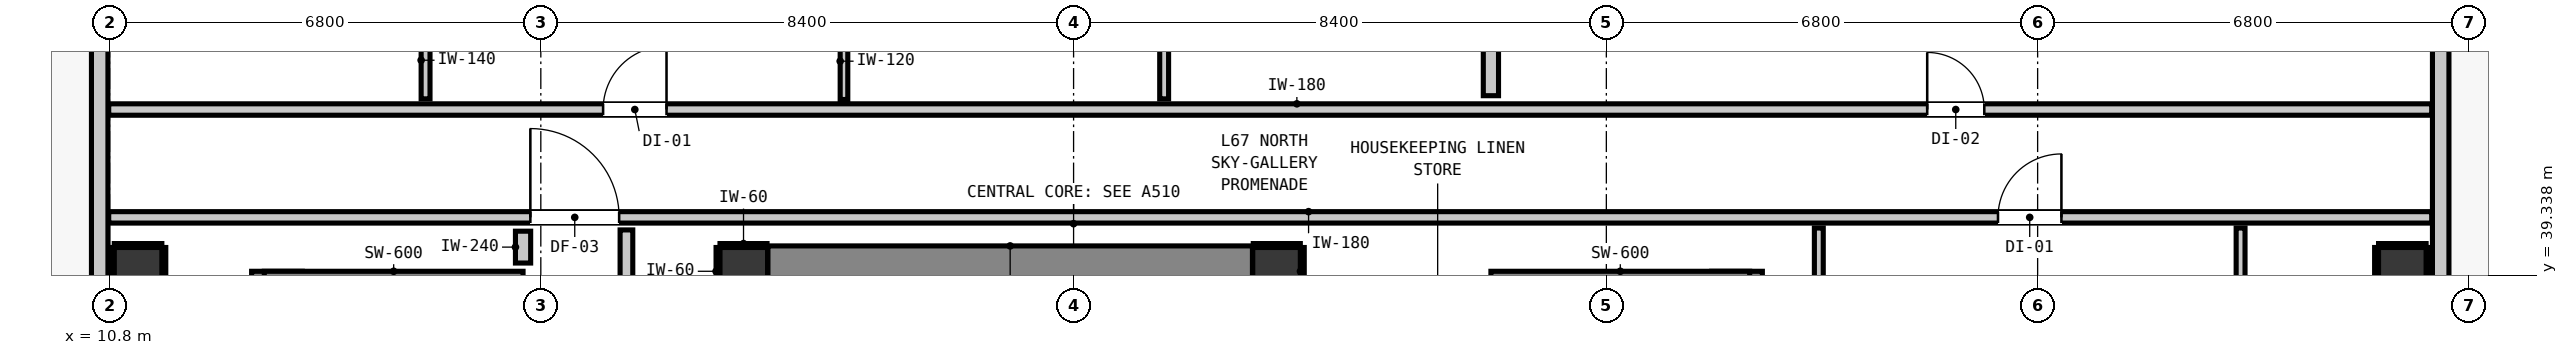
"""IFC4 building model, lengths in metres.
Left out: names, types, materials, properties, quantities, classifications, styles, units other than length and angle.
Written with IfcOpenShell. Run it as: python <this file> out.ifc"""

import sys

from ifc_helpers import new_model, si_unit, direction, frame, frame_2d, origin, origin_2d, place, context, subcontext, project, spatial, rectangle, extrude, element, fill, save


model = new_model("IFC4")
c1 = context("Model", 3, precision=1e-05, world=origin(), true_north=direction((0.0, 1.0)))
c2 = subcontext(c1, "Body", "Model", "MODEL_VIEW")
j1 = project(units=[si_unit("LENGTHUNIT", "METRE"), si_unit("PLANEANGLEUNIT", "RADIAN")], contexts=[c1])
p1 = place(None, origin())
s1 = spatial("IfcSite", under=j1, at=p1, CompositionType="ELEMENT")
p2 = place(p1, origin())
s2 = spatial("IfcBuilding", under=s1, at=p2, CompositionType="ELEMENT")
p3 = place(p2, frame((0.0, 0.0, 231.28)))
s3 = spatial("IfcBuildingStorey", under=s2, at=p3, CompositionType="ELEMENT", Elevation=231.28)
for number, where, z_axis, x_axis in (
    (1, (20.8, 39.4, 0.0), (0.0, 0.0, 1.0), (1.0, 0.0, 0.0)),
    (2, (29.2, 39.4, 0.0), (0.0, 0.0, 1.0), (1.0, 0.0, 0.0)),
):
    element("IfcColumn", number, at=place(p3, frame(where, z_axis=z_axis, x_axis=x_axis)), inside=s3, PredefinedType="COLUMN", context=c2, shape_type="SweptSolid", body=[
        extrude(rectangle(XDim=0.75, YDim=0.75, at=origin_2d()), origin(), (0.0, 0.0, 1.0), 3.32),
    ])
p4 = place(p3, frame((13.44, 31.08, 0.0), z_axis=(0.0, 0.0, 1.0), x_axis=(0.0, 1.0, 0.0)))
e3 = element("IfcWall", 3, at=p4, inside=s3, PredefinedType="SHEAR", context=c2, shape_type="SweptSolid", body=[
    extrude(rectangle(XDim=8.32, YDim=0.8, at=frame_2d((4.16, 0.0))), origin(), (0.0, 0.0, 1.0), 3.32),
])
p5 = place(p3, frame((13.24, 39.1, 0.0), z_axis=(0.0, 0.0, 1.0), x_axis=(1.0, 0.0, 0.0)))
e4 = element("IfcWall", 4, at=p5, inside=s3, PredefinedType="SHEAR", context=c2, shape_type="SweptSolid", body=[
    extrude(rectangle(XDim=4.08, YDim=0.6, at=frame_2d((2.04, 0.0))), origin(), (0.0, 0.0, 1.0), 3.32),
])
p6 = place(p3, frame((36.46, 31.08, 0.0), z_axis=(0.0, 0.0, 1.0), x_axis=(0.0, 1.0, 0.0)))
e5 = element("IfcWall", 5, at=p6, inside=s3, PredefinedType="SHEAR", context=c2, shape_type="SweptSolid", body=[
    extrude(rectangle(XDim=8.32, YDim=0.8, at=frame_2d((4.16, 0.0))), origin(), (0.0, 0.0, 1.0), 3.32),
])
p7 = place(p3, frame((32.58, 39.1, 0.0), z_axis=(0.0, 0.0, 1.0), x_axis=(1.0, 0.0, 0.0)))
e6 = element("IfcWall", 6, at=p7, inside=s3, PredefinedType="SHEAR", context=c2, shape_type="SweptSolid", body=[
    extrude(rectangle(XDim=4.08, YDim=0.6, at=frame_2d((2.04, 0.0))), origin(), (0.0, 0.0, 1.0), 3.32),
])
p8 = place(p3, frame((21.18, 39.4, 0.0), z_axis=(0.0, 0.0, 1.0), x_axis=(1.0, 0.0, 0.0)))
e7 = element("IfcWall", 7, at=p8, inside=s3, PredefinedType="SHEAR", context=c2, shape_type="SweptSolid", body=[
    extrude(rectangle(XDim=7.64, YDim=0.8, at=frame_2d((3.82, 0.0))), origin(), (0.0, 0.0, 1.0), 3.32),
])
for number, where, z_axis, x_axis in (
    (8, (11.25, 39.4, -0.2), (0.0, 0.0, 1.0), (1.0, 0.0, 0.0)),
    (9, (46.95, 39.4, -0.2), (0.0, 0.0, 1.0), (1.0, 0.0, 0.0)),
):
    element("IfcColumn", number, at=place(p3, frame(where, z_axis=z_axis, x_axis=x_axis)), inside=s3, PredefinedType="COLUMN", context=c2, shape_type="SweptSolid", body=[
        extrude(rectangle(XDim=0.75, YDim=0.75, at=origin_2d()), origin(), (0.0, 0.0, 1.0), 3.52),
    ])
p9 = place(p3, frame((10.645, 18.545, 0.0), z_axis=(0.0, 0.0, 1.0), x_axis=(0.0, 1.0, 0.0)))
e10 = element("IfcWall", 10, at=p9, inside=s3, PredefinedType="STANDARD", context=c2, shape_type="SweptSolid", body=[
    extrude(rectangle(XDim=30.31, YDim=0.26, at=frame_2d((15.155, 0.0))), origin(), (0.0, 0.0, 1.0), 3.1),
])
p10 = place(p9, frame((27.695, 0.0, 0.0)))
e11 = element("IfcOpeningElement", 11, at=p10, cuts=e10, PredefinedType="OPENING", context=c2, shape_type="SweptSolid", body=[
    extrude(rectangle(XDim=1.0, YDim=2.15, at=frame_2d((0.5, 1.075))), frame((0.0, 0.14, 0.0), z_axis=(0.0, -1.0, 0.0), x_axis=(1.0, 0.0, 0.0)), (0.0, 0.0, 1.0), 0.28),
])
p11 = place(p9, frame((29.108, 0.0, 0.85)))
e12 = element("IfcOpeningElement", 12, at=p11, cuts=e10, PredefinedType="OPENING", context=c2, shape_type="SweptSolid", body=[
    extrude(rectangle(XDim=0.9, YDim=1.5, at=frame_2d((0.45, 0.75))), frame((0.0, 0.14, 0.0), z_axis=(0.0, -1.0, 0.0), x_axis=(1.0, 0.0, 0.0)), (0.0, 0.0, 1.0), 0.28),
])
p12 = place(p3, frame((47.555, 48.855, 0.0), z_axis=(0.0, 0.0, 1.0), x_axis=(0.0, -1.0, 0.0)))
e13 = element("IfcWall", 13, at=p12, inside=s3, PredefinedType="STANDARD", context=c2, shape_type="SweptSolid", body=[
    extrude(rectangle(XDim=30.31, YDim=0.26, at=frame_2d((15.155, 0.0))), origin(), (0.0, 0.0, 1.0), 3.1),
])
p13 = place(p12, frame((0.91, 0.0, 0.0)))
e14 = element("IfcOpeningElement", 14, at=p13, cuts=e13, PredefinedType="OPENING", context=c2, shape_type="SweptSolid", body=[
    extrude(rectangle(XDim=1.0, YDim=2.15, at=frame_2d((0.5, 1.075))), frame((0.0, 0.14, 0.0), z_axis=(0.0, -1.0, 0.0), x_axis=(1.0, 0.0, 0.0)), (0.0, 0.0, 1.0), 0.28),
])
p14 = place(p12, frame((3.107, 0.0, 0.85)))
e15 = element("IfcOpeningElement", 15, at=p14, cuts=e13, PredefinedType="OPENING", context=c2, shape_type="SweptSolid", body=[
    extrude(rectangle(XDim=2.7, YDim=2.0, at=frame_2d((1.35, 1.0))), frame((0.0, 0.14, 0.0), z_axis=(0.0, -1.0, 0.0), x_axis=(1.0, 0.0, 0.0)), (0.0, 0.0, 1.0), 0.28),
])
p15 = place(p3, frame((10.787, 40.25, 0.0), z_axis=(0.0, 0.0, 1.0), x_axis=(1.0, 0.0, 0.0)))
e16 = element("IfcWall", 16, at=p15, inside=s3, PredefinedType="PARTITIONING", context=c2, shape_type="SweptSolid", body=[
    extrude(rectangle(XDim=36.626, YDim=0.18, at=frame_2d((18.313, 0.0))), origin(), (0.0, 0.0, 1.0), 3.1),
])
p16 = place(p15, frame((6.648, 0.0, 0.0)))
e17 = element("IfcOpeningElement", 17, at=p16, cuts=e16, PredefinedType="OPENING", context=c2, shape_type="SweptSolid", body=[
    extrude(rectangle(XDim=1.4, YDim=2.15, at=frame_2d((0.7, 1.075))), frame((0.0, 0.1, 0.0), z_axis=(0.0, -1.0, 0.0), x_axis=(1.0, 0.0, 0.0)), (0.0, 0.0, 1.0), 0.2),
])
p17 = place(p15, frame((29.788, 0.0, 0.0)))
e18 = element("IfcOpeningElement", 18, at=p17, cuts=e16, PredefinedType="OPENING", context=c2, shape_type="SweptSolid", body=[
    extrude(rectangle(XDim=1.0, YDim=2.15, at=frame_2d((0.5, 1.075))), frame((0.0, 0.1, 0.0), z_axis=(0.0, -1.0, 0.0), x_axis=(1.0, 0.0, 0.0)), (0.0, 0.0, 1.0), 0.2),
])
p18 = place(p3, frame((10.787, 41.95, 0.0), z_axis=(0.0, 0.0, 1.0), x_axis=(1.0, 0.0, 0.0)))
e19 = element("IfcWall", 19, at=p18, inside=s3, PredefinedType="PARTITIONING", context=c2, shape_type="SweptSolid", body=[
    extrude(rectangle(XDim=36.626, YDim=0.18, at=frame_2d((18.313, 0.0))), origin(), (0.0, 0.0, 1.0), 3.1),
])
p19 = place(p18, frame((7.795, 0.0, 0.0)))
e20 = element("IfcOpeningElement", 20, at=p19, cuts=e19, PredefinedType="OPENING", context=c2, shape_type="SweptSolid", body=[
    extrude(rectangle(XDim=1.0, YDim=2.15, at=frame_2d((0.5, 1.075))), frame((0.0, 0.1, 0.0), z_axis=(0.0, -1.0, 0.0), x_axis=(1.0, 0.0, 0.0)), (0.0, 0.0, 1.0), 0.2),
])
p20 = place(p18, frame((28.672, 0.0, 0.0)))
e21 = element("IfcOpeningElement", 21, at=p20, cuts=e19, PredefinedType="OPENING", context=c2, shape_type="SweptSolid", body=[
    extrude(rectangle(XDim=0.9, YDim=2.1, at=frame_2d((0.45, 1.05))), frame((0.0, 0.1, 0.0), z_axis=(0.0, -1.0, 0.0), x_axis=(1.0, 0.0, 0.0)), (0.0, 0.0, 1.0), 0.2),
])
p21 = place(p3, frame((17.32, 39.53, 0.0), z_axis=(0.0, 0.0, 1.0), x_axis=(0.0, 1.0, 0.0)))
e22 = element("IfcWall", 22, at=p21, inside=s3, PredefinedType="PARTITIONING", context=c2, shape_type="SweptSolid", body=[
    extrude(rectangle(XDim=0.502, YDim=0.24, at=frame_2d((0.251, 0.0))), origin(), (0.0, 0.0, 1.0), 3.1),
])
p22 = place(p3, frame((32.58, 42.168, 0.0), z_axis=(0.0, 0.0, 1.0), x_axis=(0.0, 1.0, 0.0)))
e23 = element("IfcWall", 23, at=p22, inside=s3, PredefinedType="PARTITIONING", context=c2, shape_type="SweptSolid", body=[
    extrude(rectangle(XDim=3.46, YDim=0.24, at=frame_2d((1.73, 0.0))), origin(), (0.0, 0.0, 1.0), 3.1),
])
p23 = place(p3, frame((18.95, 38.918, 0.0), z_axis=(0.0, 0.0, 1.0), x_axis=(0.0, 1.0, 0.0)))
e24 = element("IfcWall", 24, at=p23, inside=s3, PredefinedType="PARTITIONING", context=c2, shape_type="SweptSolid", body=[
    extrude(rectangle(XDim=1.134, YDim=0.2, at=frame_2d((0.567, 0.0))), origin(), (0.0, 0.0, 1.0), 3.1),
])
p24 = place(p3, frame((15.783, 42.118, 0.0), z_axis=(0.0, 0.0, 1.0), x_axis=(0.0, 1.0, 0.0)))
e25 = element("IfcWall", 25, at=p24, inside=s3, PredefinedType="PARTITIONING", context=c2, shape_type="SweptSolid", body=[
    extrude(rectangle(XDim=3.49, YDim=0.14, at=frame_2d((1.745, 0.0))), origin(), (0.0, 0.0, 1.0), 3.1),
])
p25 = place(p24, frame((1.318, 0.0, 0.0)))
e26 = element("IfcOpeningElement", 26, at=p25, cuts=e25, PredefinedType="OPENING", context=c2, shape_type="SweptSolid", body=[
    extrude(rectangle(XDim=0.86, YDim=2.02, at=frame_2d((0.43, 1.01))), frame((0.0, 0.08, 0.0), z_axis=(0.0, -1.0, 0.0), x_axis=(1.0, 0.0, 0.0)), (0.0, 0.0, 1.0), 0.16),
])
p26 = place(p3, frame((27.428, 42.118, 0.0), z_axis=(0.0, 0.0, 1.0), x_axis=(0.0, 1.0, 0.0)))
e27 = element("IfcWall", 27, at=p26, inside=s3, PredefinedType="PARTITIONING", context=c2, shape_type="SweptSolid", body=[
    extrude(rectangle(XDim=3.49, YDim=0.14, at=frame_2d((1.745, 0.0))), origin(), (0.0, 0.0, 1.0), 3.1),
])
p27 = place(p26, frame((1.285, 0.0, 0.0)))
e28 = element("IfcOpeningElement", 28, at=p27, cuts=e27, PredefinedType="OPENING", context=c2, shape_type="SweptSolid", body=[
    extrude(rectangle(XDim=0.9, YDim=2.1, at=frame_2d((0.45, 1.05))), frame((0.0, 0.08, 0.0), z_axis=(0.0, -1.0, 0.0), x_axis=(1.0, 0.0, 0.0)), (0.0, 0.0, 1.0), 0.16),
])
p28 = place(p3, frame((37.75, 30.848, 0.0), z_axis=(0.0, 0.0, 1.0), x_axis=(0.0, 1.0, 0.0)))
e29 = element("IfcWall", 29, at=p28, inside=s3, PredefinedType="PARTITIONING", context=c2, shape_type="SweptSolid", body=[
    extrude(rectangle(XDim=9.234, YDim=0.14, at=frame_2d((4.617, 0.0))), origin(), (0.0, 0.0, 1.0), 3.1),
])
p29 = place(p3, frame((44.4, 36.218, 0.0), z_axis=(0.0, 0.0, 1.0), x_axis=(0.0, 1.0, 0.0)))
e30 = element("IfcWall", 30, at=p29, inside=s3, PredefinedType="PARTITIONING", context=c2, shape_type="SweptSolid", body=[
    extrude(rectangle(XDim=3.864, YDim=0.14, at=frame_2d((1.932, 0.0))), origin(), (0.0, 0.0, 1.0), 3.1),
])
p30 = place(p29, frame((1.394, 0.0, 0.0)))
e31 = element("IfcOpeningElement", 31, at=p30, cuts=e30, PredefinedType="OPENING", context=c2, shape_type="SweptSolid", body=[
    extrude(rectangle(XDim=0.9, YDim=2.1, at=frame_2d((0.45, 1.05))), frame((0.0, 0.08, 0.0), z_axis=(0.0, -1.0, 0.0), x_axis=(1.0, 0.0, 0.0)), (0.0, 0.0, 1.0), 0.16),
])
p31 = place(p3, frame((22.38, 42.108, 0.0), z_axis=(0.0, 0.0, 1.0), x_axis=(0.0, 1.0, 0.0)))
e32 = element("IfcWall", 32, at=p31, inside=s3, PredefinedType="PARTITIONING", context=c2, shape_type="SweptSolid", body=[
    extrude(rectangle(XDim=3.51, YDim=0.12, at=frame_2d((1.755, 0.0))), origin(), (0.0, 0.0, 1.0), 3.1),
])
p32 = place(p31, frame((1.308, 0.0, 0.0)))
e33 = element("IfcOpeningElement", 33, at=p32, cuts=e32, PredefinedType="OPENING", context=c2, shape_type="SweptSolid", body=[
    extrude(rectangle(XDim=0.9, YDim=2.1, at=frame_2d((0.45, 1.05))), frame((0.0, 0.07, 0.0), z_axis=(0.0, -1.0, 0.0), x_axis=(1.0, 0.0, 0.0)), (0.0, 0.0, 1.0), 0.14),
])
p33 = place(p3, frame((20.425, 39.807, 0.0), z_axis=(0.0, 0.0, 1.0), x_axis=(1.0, 0.0, 0.0)))
e34 = element("IfcWall", 34, at=p33, inside=s3, PredefinedType="PARTITIONING", context=c2, shape_type="SweptSolid", body=[
    extrude(rectangle(XDim=0.742, YDim=0.06, at=frame_2d((0.371, 0.0))), origin(), (0.0, 0.0, 1.0), 1.45),
])
p34 = place(p3, frame((20.393, 39.025, 0.0), z_axis=(0.0, 0.0, 1.0), x_axis=(0.0, 1.0, 0.0)))
e35 = element("IfcWall", 35, at=p34, inside=s3, PredefinedType="PARTITIONING", context=c2, shape_type="SweptSolid", body=[
    extrude(rectangle(XDim=0.75, YDim=0.06, at=frame_2d((0.375, 0.0))), origin(), (0.0, 0.0, 1.0), 1.45),
])
p35 = place(p3, frame((28.833, 39.807, 0.0), z_axis=(0.0, 0.0, 1.0), x_axis=(1.0, 0.0, 0.0)))
e36 = element("IfcWall", 36, at=p35, inside=s3, PredefinedType="PARTITIONING", context=c2, shape_type="SweptSolid", body=[
    extrude(rectangle(XDim=0.742, YDim=0.06, at=frame_2d((0.371, 0.0))), origin(), (0.0, 0.0, 1.0), 1.45),
])
for number, where, z_axis, x_axis in (
    (37, (29.607, 39.025, 0.0), (0.0, 0.0, 1.0), (0.0, 1.0, 0.0)),
    (38, (10.875, 39.807, 0.0), (0.0, 0.0, 1.0), (1.0, 0.0, 0.0)),
    (39, (10.843, 39.025, 0.0), (0.0, 0.0, 1.0), (0.0, 1.0, 0.0)),
    (40, (11.657, 39.025, 0.0), (0.0, 0.0, 1.0), (0.0, 1.0, 0.0)),
    (41, (46.575, 39.807, 0.0), (0.0, 0.0, 1.0), (1.0, 0.0, 0.0)),
    (42, (46.543, 39.025, 0.0), (0.0, 0.0, 1.0), (0.0, 1.0, 0.0)),
    (43, (47.357, 39.025, 0.0), (0.0, 0.0, 1.0), (0.0, 1.0, 0.0)),
):
    element("IfcWall", number, at=place(p3, frame(where, z_axis=z_axis, x_axis=x_axis)), inside=s3, PredefinedType="PARTITIONING", context=c2, shape_type="SweptSolid", body=[
        extrude(rectangle(XDim=0.75, YDim=0.06, at=frame_2d((0.375, 0.0))), origin(), (0.0, 0.0, 1.0), 1.45),
    ])
p36 = place(p16, origin())
e44 = element("IfcDoor", 44, at=p36, inside=s3, OperationType="SINGLE_SWING_LEFT", PredefinedType="DOOR", context=c2, shape_type="SweptSolid", body=[
    extrude(rectangle(XDim=1.4, YDim=2.15, at=frame_2d((0.7, 1.075))), frame((0.0, 0.025, 0.0), z_axis=(0.0, -1.0, 0.0), x_axis=(1.0, 0.0, 0.0)), (0.0, 0.0, 1.0), 0.05),
])
fill(e17, e44)
p37 = place(p19, origin())
e45 = element("IfcDoor", 45, at=p37, inside=s3, OperationType="SINGLE_SWING_RIGHT", PredefinedType="DOOR", context=c2, shape_type="SweptSolid", body=[
    extrude(rectangle(XDim=1.0, YDim=2.15, at=frame_2d((0.5, 1.075))), frame((0.0, 0.025, 0.0), z_axis=(0.0, -1.0, 0.0), x_axis=(1.0, 0.0, 0.0)), (0.0, 0.0, 1.0), 0.05),
])
fill(e20, e45)
p38 = place(p20, origin())
e46 = element("IfcDoor", 46, at=p38, inside=s3, OperationType="SINGLE_SWING_LEFT", PredefinedType="DOOR", context=c2, shape_type="SweptSolid", body=[
    extrude(rectangle(XDim=0.9, YDim=2.1, at=frame_2d((0.45, 1.05))), frame((0.0, 0.025, 0.0), z_axis=(0.0, -1.0, 0.0), x_axis=(1.0, 0.0, 0.0)), (0.0, 0.0, 1.0), 0.05),
])
fill(e21, e46)
p39 = place(p17, origin())
e47 = element("IfcDoor", 47, at=p39, inside=s3, OperationType="SINGLE_SWING_RIGHT", PredefinedType="DOOR", context=c2, shape_type="SweptSolid", body=[
    extrude(rectangle(XDim=1.0, YDim=2.15, at=frame_2d((0.5, 1.075))), frame((0.0, 0.025, 0.0), z_axis=(0.0, -1.0, 0.0), x_axis=(1.0, 0.0, 0.0)), (0.0, 0.0, 1.0), 0.05),
])
fill(e18, e47)
save(model, sys.argv[1])
